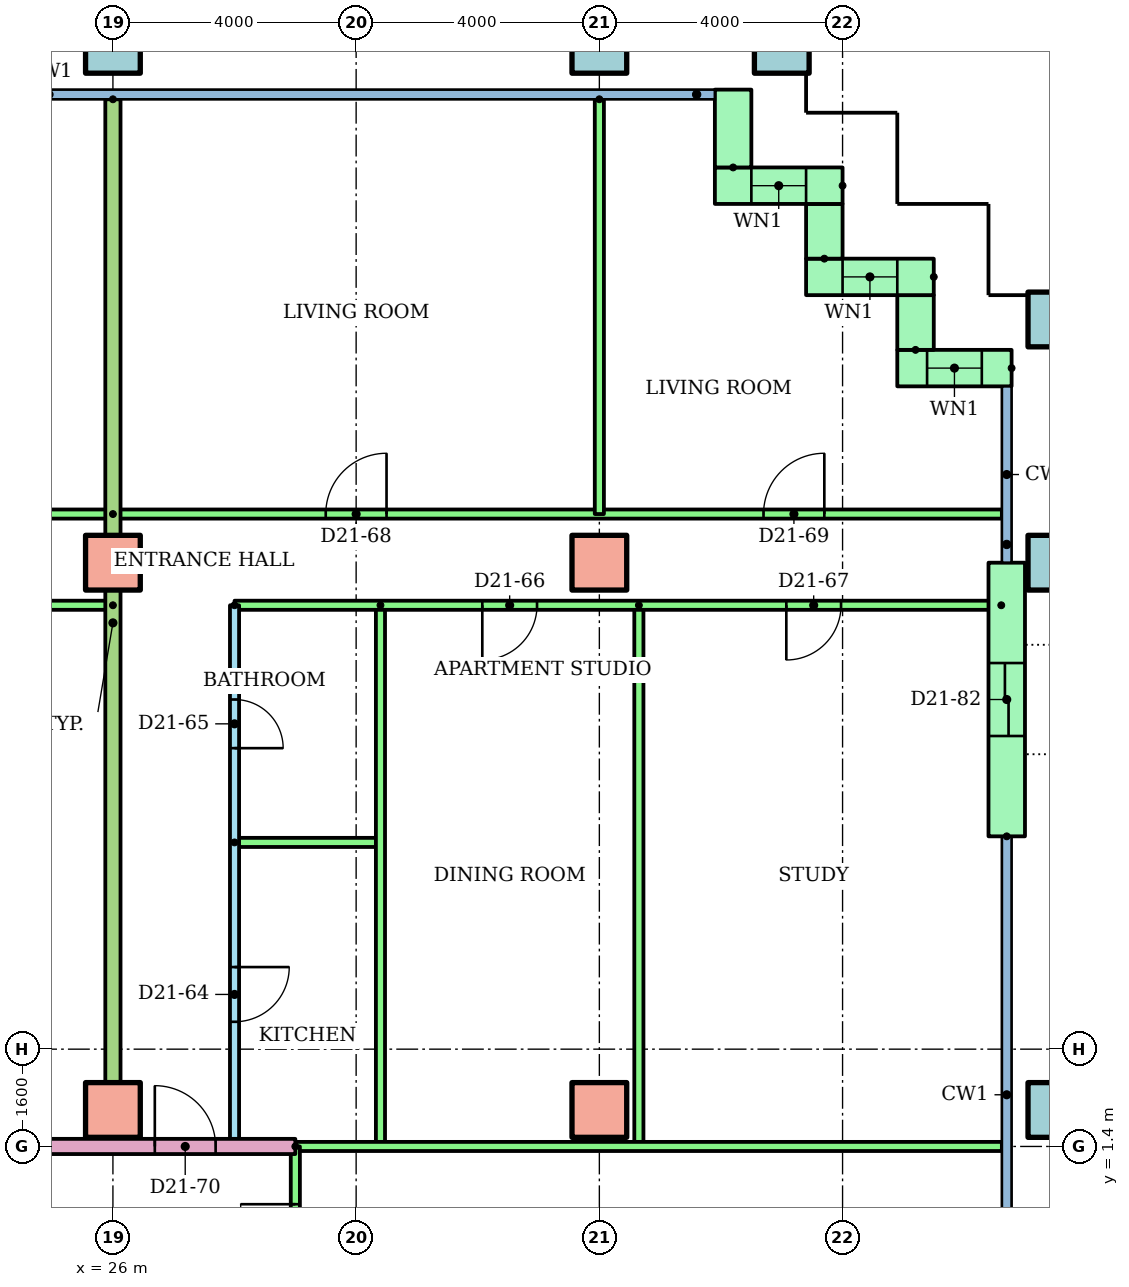
"""IFC4 building model, lengths in metres.
Left out: names, types, materials, properties, quantities, classifications, styles, units other than length and angle.
Written with IfcOpenShell. Run it as: python <this file> out.ifc"""

import sys

from ifc_helpers import new_model, si_unit, direction, frame, frame_2d, origin, origin_2d, place, context, subcontext, project, spatial, rectangle, hollow_rectangle, extrude, element, fill, save


model = new_model("IFC4")
c1 = context("Model", 3, precision=1e-05, world=origin(), true_north=direction((0.0, 1.0)))
c2 = subcontext(c1, "Body", "Model", "MODEL_VIEW")
j1 = project(units=[si_unit("LENGTHUNIT", "METRE"), si_unit("PLANEANGLEUNIT", "RADIAN")], contexts=[c1])
p1 = place(None, origin())
s1 = spatial("IfcSite", under=j1, at=p1, CompositionType="ELEMENT")
p2 = place(p1, origin())
s2 = spatial("IfcBuilding", under=s1, at=p2, CompositionType="ELEMENT")
p3 = place(p2, frame((0.0, 0.0, 83.9)))
s3 = spatial("IfcBuildingStorey", under=s2, at=p3, CompositionType="ELEMENT", Elevation=83.9)
for number, where in (
    (1, (26.0, 2.0, 0.0)),
    (2, (34.0, 2.0, 0.0)),
):
    element("IfcColumn", number, at=place(p3, frame(where)), inside=s3, PredefinedType="COLUMN", context=c2, shape_type="SweptSolid", body=[
        extrude(rectangle(XDim=0.9, YDim=0.9, at=origin_2d()), origin(), (0.0, 0.0, 1.0), 3.2),
    ])
p4 = place(p3, frame((41.5, 2.0, 0.0)))
e3 = element("IfcColumn", 3, at=p4, inside=s3, PredefinedType="COLUMN", context=c2, shape_type="SweptSolid", body=[
    extrude(hollow_rectangle(XDim=0.9, YDim=0.9, WallThickness=0.045, at=origin_2d()), origin(), (0.0, 0.0, 1.0), 3.2),
])
for number, where in (
    (4, (26.0, 11.0, 0.0)),
    (5, (34.0, 11.0, 0.0)),
):
    element("IfcColumn", number, at=place(p3, frame(where)), inside=s3, PredefinedType="COLUMN", context=c2, shape_type="SweptSolid", body=[
        extrude(rectangle(XDim=0.9, YDim=0.9, at=origin_2d()), origin(), (0.0, 0.0, 1.0), 3.2),
    ])
for number, where in (
    (6, (41.5, 11.0, 0.0)),
    (7, (41.5, 15.0, 0.0)),
    (8, (26.0, 19.5, 0.0)),
    (9, (34.0, 19.5, 0.0)),
    (10, (37.0, 19.5, 0.0)),
):
    element("IfcColumn", number, at=place(p3, frame(where)), inside=s3, PredefinedType="COLUMN", context=c2, shape_type="SweptSolid", body=[
        extrude(hollow_rectangle(XDim=0.9, YDim=0.9, WallThickness=0.045, at=origin_2d()), origin(), (0.0, 0.0, 1.0), 3.2),
    ])
p5 = place(p3, frame((40.78, 14.2, 0.0), z_axis=(0.0, 0.0, 1.0), x_axis=(-1.0, 0.0, 0.0)))
e11 = element("IfcWall", 11, at=p5, inside=s3, PredefinedType="STANDARD", context=c2, shape_type="SweptSolid", body=[
    extrude(rectangle(XDim=1.88, YDim=0.6, at=frame_2d((0.94, 0.0))), origin(), (0.0, 0.0, 1.0), 2.92),
])
p6 = place(p5, frame((0.49, 0.0, 0.9)))
e12 = element("IfcOpeningElement", 12, at=p6, cuts=e11, PredefinedType="OPENING", context=c2, shape_type="SweptSolid", body=[
    extrude(rectangle(XDim=0.9, YDim=1.5, at=frame_2d((0.45, 0.75))), frame((0.0, 0.31, 0.0), z_axis=(0.0, -1.0, 0.0), x_axis=(1.0, 0.0, 0.0)), (0.0, 0.0, 1.0), 0.62),
])
p7 = place(p3, frame((39.2, 14.5, 0.0), z_axis=(0.0, 0.0, 1.0), x_axis=(0.0, 1.0, 0.0)))
e13 = element("IfcWall", 13, at=p7, inside=s3, PredefinedType="STANDARD", context=c2, shape_type="SweptSolid", body=[
    extrude(rectangle(XDim=0.9, YDim=0.6, at=frame_2d((0.45, 0.0))), origin(), (0.0, 0.0, 1.0), 2.92),
])
p8 = place(p3, frame((39.5, 15.7, 0.0), z_axis=(0.0, 0.0, 1.0), x_axis=(-1.0, 0.0, 0.0)))
e14 = element("IfcWall", 14, at=p8, inside=s3, PredefinedType="STANDARD", context=c2, shape_type="SweptSolid", body=[
    extrude(rectangle(XDim=2.1, YDim=0.6, at=frame_2d((1.05, 0.0))), origin(), (0.0, 0.0, 1.0), 2.92),
])
p9 = place(p8, frame((0.6, 0.0, 0.9)))
e15 = element("IfcOpeningElement", 15, at=p9, cuts=e14, PredefinedType="OPENING", context=c2, shape_type="SweptSolid", body=[
    extrude(rectangle(XDim=0.9, YDim=1.5, at=frame_2d((0.45, 0.75))), frame((0.0, 0.31, 0.0), z_axis=(0.0, -1.0, 0.0), x_axis=(1.0, 0.0, 0.0)), (0.0, 0.0, 1.0), 0.62),
])
p10 = place(p3, frame((37.7, 16.0, 0.0), z_axis=(0.0, 0.0, 1.0), x_axis=(0.0, 1.0, 0.0)))
e16 = element("IfcWall", 16, at=p10, inside=s3, PredefinedType="STANDARD", context=c2, shape_type="SweptSolid", body=[
    extrude(rectangle(XDim=0.9, YDim=0.6, at=frame_2d((0.45, 0.0))), origin(), (0.0, 0.0, 1.0), 2.92),
])
p11 = place(p3, frame((38.0, 17.2, 0.0), z_axis=(0.0, 0.0, 1.0), x_axis=(-1.0, 0.0, 0.0)))
e17 = element("IfcWall", 17, at=p11, inside=s3, PredefinedType="STANDARD", context=c2, shape_type="SweptSolid", body=[
    extrude(rectangle(XDim=2.1, YDim=0.6, at=frame_2d((1.05, 0.0))), origin(), (0.0, 0.0, 1.0), 2.92),
])
p12 = place(p11, frame((0.6, 0.0, 0.9)))
e18 = element("IfcOpeningElement", 18, at=p12, cuts=e17, PredefinedType="OPENING", context=c2, shape_type="SweptSolid", body=[
    extrude(rectangle(XDim=0.9, YDim=1.5, at=frame_2d((0.45, 0.75))), frame((0.0, 0.31, 0.0), z_axis=(0.0, -1.0, 0.0), x_axis=(1.0, 0.0, 0.0)), (0.0, 0.0, 1.0), 0.62),
])
p13 = place(p3, frame((36.2, 17.5, 0.0), z_axis=(0.0, 0.0, 1.0), x_axis=(0.0, 1.0, 0.0)))
e19 = element("IfcWall", 19, at=p13, inside=s3, PredefinedType="STANDARD", context=c2, shape_type="SweptSolid", body=[
    extrude(rectangle(XDim=1.28, YDim=0.6, at=frame_2d((0.64, 0.0))), origin(), (0.0, 0.0, 1.0), 2.92),
])
p14 = place(p3, frame((40.7, 6.5, 0.0), z_axis=(0.0, 0.0, 1.0), x_axis=(0.0, 1.0, 0.0)))
e20 = element("IfcWall", 20, at=p14, inside=s3, PredefinedType="STANDARD", context=c2, shape_type="SweptSolid", body=[
    extrude(rectangle(XDim=4.5, YDim=0.6, at=frame_2d((2.25, 0.0))), origin(), (0.0, 0.0, 1.0), 2.92),
])
p15 = place(p14, frame((1.65, 0.0, 0.0)))
e21 = element("IfcOpeningElement", 21, at=p15, cuts=e20, PredefinedType="OPENING", context=c2, shape_type="SweptSolid", body=[
    extrude(rectangle(XDim=1.2, YDim=2.1, at=frame_2d((0.6, 1.05))), frame((0.0, 0.31, 0.0), z_axis=(0.0, -1.0, 0.0), x_axis=(1.0, 0.0, 0.0)), (0.0, 0.0, 1.0), 0.62),
])
p16 = place(p3, frame((26.0, 10.3, 0.0), z_axis=(0.0, 0.0, 1.0), x_axis=(-1.0, 0.0, 0.0)))
e22 = element("IfcWall", 22, at=p16, inside=s3, PredefinedType="PARTITIONING", context=c2, shape_type="SweptSolid", body=[
    extrude(rectangle(XDim=10.0, YDim=0.15, at=frame_2d((5.0, 0.0))), origin(), (0.0, 0.0, 1.0), 2.4),
])
p17 = place(p16, frame((5.525, 0.0, 0.0)))
e23 = element("IfcOpeningElement", 23, at=p17, cuts=e22, PredefinedType="OPENING", context=c2, shape_type="SweptSolid", body=[
    extrude(rectangle(XDim=0.9, YDim=2.1, at=frame_2d((0.45, 1.05))), frame((0.0, 0.085, 0.0), z_axis=(0.0, -1.0, 0.0), x_axis=(1.0, 0.0, 0.0)), (0.0, 0.0, 1.0), 0.17),
])
p18 = place(p16, frame((1.725, 0.0, 0.0)))
e24 = element("IfcOpeningElement", 24, at=p18, cuts=e22, PredefinedType="OPENING", context=c2, shape_type="SweptSolid", body=[
    extrude(rectangle(XDim=0.9, YDim=2.1, at=frame_2d((0.45, 1.05))), frame((0.0, 0.085, 0.0), z_axis=(0.0, -1.0, 0.0), x_axis=(1.0, 0.0, 0.0)), (0.0, 0.0, 1.0), 0.17),
])
p19 = place(p3, frame((14.0, 11.8, 0.0)))
e25 = element("IfcWall", 25, at=p19, inside=s3, PredefinedType="PARTITIONING", context=c2, shape_type="SweptSolid", body=[
    extrude(rectangle(XDim=12.0, YDim=0.15, at=frame_2d((6.0, 0.0))), origin(), (0.0, 0.0, 1.0), 2.4),
])
p20 = place(p19, frame((1.5, 0.0, 0.0)))
e26 = element("IfcOpeningElement", 26, at=p20, cuts=e25, PredefinedType="OPENING", context=c2, shape_type="SweptSolid", body=[
    extrude(rectangle(XDim=1.0, YDim=2.1, at=frame_2d((0.5, 1.05))), frame((0.0, 0.085, 0.0), z_axis=(0.0, -1.0, 0.0), x_axis=(1.0, 0.0, 0.0)), (0.0, 0.0, 1.0), 0.17),
])
p21 = place(p19, frame((7.5, 0.0, 0.0)))
e27 = element("IfcOpeningElement", 27, at=p21, cuts=e25, PredefinedType="OPENING", context=c2, shape_type="SweptSolid", body=[
    extrude(rectangle(XDim=1.0, YDim=2.1, at=frame_2d((0.5, 1.05))), frame((0.0, 0.085, 0.0), z_axis=(0.0, -1.0, 0.0), x_axis=(1.0, 0.0, 0.0)), (0.0, 0.0, 1.0), 0.17),
])
p22 = place(p3, frame((28.0, 10.3, 0.0), z_axis=(0.0, 0.0, 1.0), x_axis=(0.0, -1.0, 0.0)))
e28 = element("IfcWall", 28, at=p22, inside=s3, PredefinedType="PARTITIONING", context=c2, shape_type="SweptSolid", body=[
    extrude(rectangle(XDim=8.9, YDim=0.15, at=frame_2d((4.45, 0.0))), origin(), (0.0, 0.0, 1.0), 2.4),
])
p23 = place(p22, frame((5.95, 0.0, 0.0)))
e29 = element("IfcOpeningElement", 29, at=p23, cuts=e28, PredefinedType="OPENING", context=c2, shape_type="SweptSolid", body=[
    extrude(rectangle(XDim=0.9, YDim=2.1, at=frame_2d((0.45, 1.05))), frame((0.0, 0.085, 0.0), z_axis=(0.0, -1.0, 0.0), x_axis=(1.0, 0.0, 0.0)), (0.0, 0.0, 1.0), 0.17),
])
p24 = place(p22, frame((1.55, 0.0, 0.0)))
e30 = element("IfcOpeningElement", 30, at=p24, cuts=e28, PredefinedType="OPENING", context=c2, shape_type="SweptSolid", body=[
    extrude(rectangle(XDim=0.8, YDim=2.1, at=frame_2d((0.4, 1.05))), frame((0.0, 0.085, 0.0), z_axis=(0.0, -1.0, 0.0), x_axis=(1.0, 0.0, 0.0)), (0.0, 0.0, 1.0), 0.17),
])
p25 = place(p3, frame((28.0, 6.4, 0.0)))
e31 = element("IfcWall", 31, at=p25, inside=s3, PredefinedType="PARTITIONING", context=c2, shape_type="SweptSolid", body=[
    extrude(rectangle(XDim=2.4, YDim=0.15, at=frame_2d((1.2, 0.0))), origin(), (0.0, 0.0, 1.0), 2.4),
])
for number, where, z_axis, x_axis in (
    (32, (30.4, 10.3, 0.0), (0.0, 0.0, 1.0), (0.0, -1.0, 0.0)),
    (33, (34.65, 10.3, 0.0), (0.0, 0.0, 1.0), (0.0, -1.0, 0.0)),
):
    element("IfcWall", number, at=place(p3, frame(where, z_axis=z_axis, x_axis=x_axis)), inside=s3, PredefinedType="PARTITIONING", context=c2, shape_type="SweptSolid", body=[
        extrude(rectangle(XDim=8.9, YDim=0.15, at=frame_2d((4.45, 0.0))), origin(), (0.0, 0.0, 1.0), 2.4),
    ])
p26 = place(p3, frame((40.61, 10.3, 0.0), z_axis=(0.0, 0.0, 1.0), x_axis=(-1.0, 0.0, 0.0)))
e34 = element("IfcWall", 34, at=p26, inside=s3, PredefinedType="PARTITIONING", context=c2, shape_type="SweptSolid", body=[
    extrude(rectangle(XDim=12.61, YDim=0.15, at=frame_2d((6.305, 0.0))), origin(), (0.0, 0.0, 1.0), 2.4),
])
p27 = place(p26, frame((7.635, 0.0, 0.0)))
e35 = element("IfcOpeningElement", 35, at=p27, cuts=e34, PredefinedType="OPENING", context=c2, shape_type="SweptSolid", body=[
    extrude(rectangle(XDim=0.9, YDim=2.1, at=frame_2d((0.45, 1.05))), frame((0.0, 0.085, 0.0), z_axis=(0.0, -1.0, 0.0), x_axis=(1.0, 0.0, 0.0)), (0.0, 0.0, 1.0), 0.17),
])
p28 = place(p26, frame((2.635, 0.0, 0.0)))
e36 = element("IfcOpeningElement", 36, at=p28, cuts=e34, PredefinedType="OPENING", context=c2, shape_type="SweptSolid", body=[
    extrude(rectangle(XDim=0.9, YDim=2.1, at=frame_2d((0.45, 1.05))), frame((0.0, 0.085, 0.0), z_axis=(0.0, -1.0, 0.0), x_axis=(1.0, 0.0, 0.0)), (0.0, 0.0, 1.0), 0.17),
])
p29 = place(p3, frame((26.0, 11.8, 0.0)))
e37 = element("IfcWall", 37, at=p29, inside=s3, PredefinedType="PARTITIONING", context=c2, shape_type="SweptSolid", body=[
    extrude(rectangle(XDim=14.62, YDim=0.15, at=frame_2d((7.31, 0.0))), origin(), (0.0, 0.0, 1.0), 2.4),
])
p30 = place(p29, frame((3.5, 0.0, 0.0)))
e38 = element("IfcOpeningElement", 38, at=p30, cuts=e37, PredefinedType="OPENING", context=c2, shape_type="SweptSolid", body=[
    extrude(rectangle(XDim=1.0, YDim=2.1, at=frame_2d((0.5, 1.05))), frame((0.0, 0.085, 0.0), z_axis=(0.0, -1.0, 0.0), x_axis=(1.0, 0.0, 0.0)), (0.0, 0.0, 1.0), 0.17),
])
p31 = place(p29, frame((10.7, 0.0, 0.0)))
e39 = element("IfcOpeningElement", 39, at=p31, cuts=e37, PredefinedType="OPENING", context=c2, shape_type="SweptSolid", body=[
    extrude(rectangle(XDim=1.0, YDim=2.1, at=frame_2d((0.5, 1.05))), frame((0.0, 0.085, 0.0), z_axis=(0.0, -1.0, 0.0), x_axis=(1.0, 0.0, 0.0)), (0.0, 0.0, 1.0), 0.17),
])
p32 = place(p3, frame((34.0, 18.621, 0.0), z_axis=(0.0, 0.0, 1.0), x_axis=(0.0, -1.0, 0.0)))
e40 = element("IfcWall", 40, at=p32, inside=s3, PredefinedType="PARTITIONING", context=c2, shape_type="SweptSolid", body=[
    extrude(rectangle(XDim=6.821, YDim=0.15, at=frame_2d((3.411, 0.0))), origin(), (0.0, 0.0, 1.0), 2.4),
])
p33 = place(p3, frame((26.0, 18.621, 0.0), z_axis=(0.0, 0.0, 1.0), x_axis=(0.0, -1.0, 0.0)))
e41 = element("IfcWall", 41, at=p33, inside=s3, PredefinedType="PARTITIONING", context=c2, shape_type="SweptSolid", body=[
    extrude(rectangle(XDim=17.221, YDim=0.25, at=frame_2d((8.611, 0.0))), origin(), (0.0, 0.0, 1.0), 2.4),
])
p34 = place(p3, frame((14.0, 1.4, 0.0)))
e42 = element("IfcWall", 42, at=p34, inside=s3, PredefinedType="PARTITIONING", context=c2, shape_type="SweptSolid", body=[
    extrude(rectangle(XDim=15.0, YDim=0.25, at=frame_2d((7.5, 0.0))), origin(), (0.0, 0.0, 1.0), 2.4),
])
p35 = place(p34, frame((0.5, 0.0, 0.0)))
e43 = element("IfcOpeningElement", 43, at=p35, cuts=e42, PredefinedType="OPENING", context=c2, shape_type="SweptSolid", body=[
    extrude(rectangle(XDim=1.0, YDim=2.1, at=frame_2d((0.5, 1.05))), frame((0.0, 0.135, 0.0), z_axis=(0.0, -1.0, 0.0), x_axis=(1.0, 0.0, 0.0)), (0.0, 0.0, 1.0), 0.27),
])
p36 = place(p34, frame((12.689, 0.0, 0.0)))
e44 = element("IfcOpeningElement", 44, at=p36, cuts=e42, PredefinedType="OPENING", context=c2, shape_type="SweptSolid", body=[
    extrude(rectangle(XDim=1.0, YDim=2.1, at=frame_2d((0.5, 1.05))), frame((0.0, 0.135, 0.0), z_axis=(0.0, -1.0, 0.0), x_axis=(1.0, 0.0, 0.0)), (0.0, 0.0, 1.0), 0.27),
])
p37 = place(p3, frame((29.0, 1.4, 0.0)))
e45 = element("IfcWall", 45, at=p37, inside=s3, PredefinedType="PARTITIONING", context=c2, shape_type="SweptSolid", body=[
    extrude(rectangle(XDim=11.62, YDim=0.15, at=frame_2d((5.81, 0.0))), origin(), (0.0, 0.0, 1.0), 2.4),
])
p38 = place(p3, frame((29.0, -1.4, 0.0), z_axis=(0.0, 0.0, 1.0), x_axis=(0.0, 1.0, 0.0)))
e46 = element("IfcWall", 46, at=p38, inside=s3, PredefinedType="PARTITIONING", context=c2, shape_type="SweptSolid", body=[
    extrude(rectangle(XDim=2.8, YDim=0.15, at=frame_2d((1.4, 0.0))), origin(), (0.0, 0.0, 1.0), 2.4),
])
p39 = place(p38, frame((0.95, 0.0, 0.0)))
e47 = element("IfcOpeningElement", 47, at=p39, cuts=e46, PredefinedType="OPENING", context=c2, shape_type="SweptSolid", body=[
    extrude(rectangle(XDim=0.9, YDim=2.1, at=frame_2d((0.45, 1.05))), frame((0.0, 0.085, 0.0), z_axis=(0.0, -1.0, 0.0), x_axis=(1.0, 0.0, 0.0)), (0.0, 0.0, 1.0), 0.17),
])
p40 = place(p6, origin())
e48 = element("IfcWindow", 48, at=p40, inside=s3, PartitioningType="SINGLE_PANEL", PredefinedType="WINDOW", context=c2, shape_type="SweptSolid", body=[
    extrude(rectangle(XDim=0.9, YDim=1.5, at=frame_2d((0.45, 0.75))), frame((0.0, 0.03, 0.0), z_axis=(0.0, -1.0, 0.0), x_axis=(1.0, 0.0, 0.0)), (0.0, 0.0, 1.0), 0.06),
])
fill(e12, e48)
p41 = place(p9, origin())
e49 = element("IfcWindow", 49, at=p41, inside=s3, PartitioningType="SINGLE_PANEL", PredefinedType="WINDOW", context=c2, shape_type="SweptSolid", body=[
    extrude(rectangle(XDim=0.9, YDim=1.5, at=frame_2d((0.45, 0.75))), frame((0.0, 0.03, 0.0), z_axis=(0.0, -1.0, 0.0), x_axis=(1.0, 0.0, 0.0)), (0.0, 0.0, 1.0), 0.06),
])
fill(e15, e49)
p42 = place(p12, origin())
e50 = element("IfcWindow", 50, at=p42, inside=s3, PartitioningType="SINGLE_PANEL", PredefinedType="WINDOW", context=c2, shape_type="SweptSolid", body=[
    extrude(rectangle(XDim=0.9, YDim=1.5, at=frame_2d((0.45, 0.75))), frame((0.0, 0.03, 0.0), z_axis=(0.0, -1.0, 0.0), x_axis=(1.0, 0.0, 0.0)), (0.0, 0.0, 1.0), 0.06),
])
fill(e18, e50)
p43 = place(p23, origin())
e51 = element("IfcDoor", 51, at=p43, inside=s3, OperationType="SINGLE_SWING_LEFT", PredefinedType="DOOR", context=c2, shape_type="SweptSolid", body=[
    extrude(rectangle(XDim=0.9, YDim=2.1, at=frame_2d((0.45, 1.05))), frame((0.0, 0.025, 0.0), z_axis=(0.0, -1.0, 0.0), x_axis=(1.0, 0.0, 0.0)), (0.0, 0.0, 1.0), 0.05),
])
fill(e29, e51)
p44 = place(p24, origin())
e52 = element("IfcDoor", 52, at=p44, inside=s3, OperationType="SINGLE_SWING_RIGHT", PredefinedType="DOOR", context=c2, shape_type="SweptSolid", body=[
    extrude(rectangle(XDim=0.8, YDim=2.1, at=frame_2d((0.4, 1.05))), frame((0.0, 0.025, 0.0), z_axis=(0.0, -1.0, 0.0), x_axis=(1.0, 0.0, 0.0)), (0.0, 0.0, 1.0), 0.05),
])
fill(e30, e52)
p45 = place(p27, origin())
e53 = element("IfcDoor", 53, at=p45, inside=s3, OperationType="SINGLE_SWING_RIGHT", PredefinedType="DOOR", context=c2, shape_type="SweptSolid", body=[
    extrude(rectangle(XDim=0.9, YDim=2.1, at=frame_2d((0.45, 1.05))), frame((0.0, 0.025, 0.0), z_axis=(0.0, -1.0, 0.0), x_axis=(1.0, 0.0, 0.0)), (0.0, 0.0, 1.0), 0.05),
])
fill(e35, e53)
p46 = place(p28, origin())
e54 = element("IfcDoor", 54, at=p46, inside=s3, OperationType="SINGLE_SWING_RIGHT", PredefinedType="DOOR", context=c2, shape_type="SweptSolid", body=[
    extrude(rectangle(XDim=0.9, YDim=2.1, at=frame_2d((0.45, 1.05))), frame((0.0, 0.025, 0.0), z_axis=(0.0, -1.0, 0.0), x_axis=(1.0, 0.0, 0.0)), (0.0, 0.0, 1.0), 0.05),
])
fill(e36, e54)
p47 = place(p30, origin())
e55 = element("IfcDoor", 55, at=p47, inside=s3, OperationType="SINGLE_SWING_RIGHT", PredefinedType="DOOR", context=c2, shape_type="SweptSolid", body=[
    extrude(rectangle(XDim=1.0, YDim=2.1, at=frame_2d((0.5, 1.05))), frame((0.0, 0.025, 0.0), z_axis=(0.0, -1.0, 0.0), x_axis=(1.0, 0.0, 0.0)), (0.0, 0.0, 1.0), 0.05),
])
fill(e38, e55)
p48 = place(p31, origin())
e56 = element("IfcDoor", 56, at=p48, inside=s3, OperationType="SINGLE_SWING_RIGHT", PredefinedType="DOOR", context=c2, shape_type="SweptSolid", body=[
    extrude(rectangle(XDim=1.0, YDim=2.1, at=frame_2d((0.5, 1.05))), frame((0.0, 0.025, 0.0), z_axis=(0.0, -1.0, 0.0), x_axis=(1.0, 0.0, 0.0)), (0.0, 0.0, 1.0), 0.05),
])
fill(e39, e56)
p49 = place(p36, origin())
e57 = element("IfcDoor", 57, at=p49, inside=s3, OperationType="SINGLE_SWING_LEFT", PredefinedType="DOOR", context=c2, shape_type="SweptSolid", body=[
    extrude(rectangle(XDim=1.0, YDim=2.1, at=frame_2d((0.5, 1.05))), frame((0.0, 0.025, 0.0), z_axis=(0.0, -1.0, 0.0), x_axis=(1.0, 0.0, 0.0)), (0.0, 0.0, 1.0), 0.05),
])
fill(e44, e57)
p50 = place(p39, origin())
e58 = element("IfcDoor", 58, at=p50, inside=s3, OperationType="SINGLE_SWING_RIGHT", PredefinedType="DOOR", context=c2, shape_type="SweptSolid", body=[
    extrude(rectangle(XDim=0.9, YDim=2.1, at=frame_2d((0.45, 1.05))), frame((0.0, 0.025, 0.0), z_axis=(0.0, -1.0, 0.0), x_axis=(1.0, 0.0, 0.0)), (0.0, 0.0, 1.0), 0.05),
])
fill(e47, e58)
p51 = place(p15, origin())
e59 = element("IfcDoor", 59, at=p51, inside=s3, OperationType="SLIDING_TO_LEFT", PredefinedType="DOOR", context=c2, shape_type="SweptSolid", body=[
    extrude(rectangle(XDim=1.2, YDim=2.1, at=frame_2d((0.6, 1.05))), frame((0.0, 0.025, 0.0), z_axis=(0.0, -1.0, 0.0), x_axis=(1.0, 0.0, 0.0)), (0.0, 0.0, 1.0), 0.05),
])
fill(e21, e59)
save(model, sys.argv[1])
